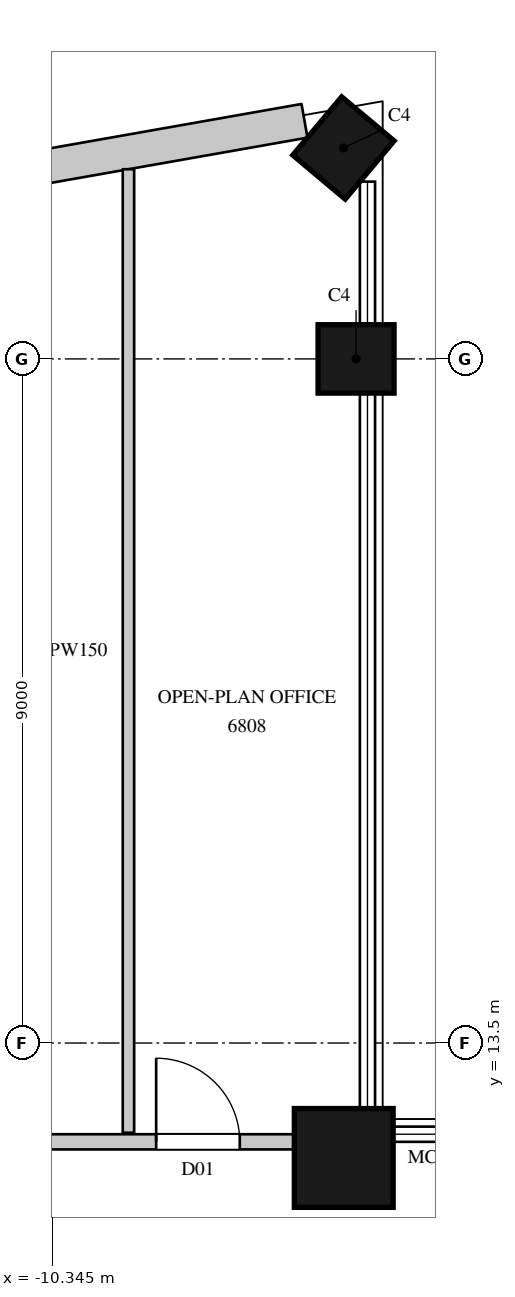
"""IFC4 building model, lengths in metres.
Left out: names, types, materials, properties, quantities, classifications, styles, units other than length and angle.
Written with IfcOpenShell. Run it as: python <this file> out.ifc"""

import sys

from ifc_helpers import new_model, si_unit, direction, frame, frame_2d, origin, origin_2d, place, context, subcontext, project, spatial, rectangle, circle, extrude, element, fill, save


model = new_model("IFC4")
c1 = context("Model", 3, precision=1e-05, world=origin(), true_north=direction((0.0, 1.0)))
c2 = subcontext(c1, "Body", "Model", "MODEL_VIEW")
j1 = project(units=[si_unit("LENGTHUNIT", "METRE"), si_unit("PLANEANGLEUNIT", "RADIAN")], contexts=[c1])
p1 = place(None, origin())
s1 = spatial("IfcSite", under=j1, at=p1, CompositionType="ELEMENT")
p2 = place(p1, origin())
s2 = spatial("IfcBuilding", under=s1, at=p2, CompositionType="ELEMENT")
p3 = place(p2, frame((0.0, 0.0, 300.8)))
s3 = spatial("IfcBuildingStorey", under=s2, at=p3, CompositionType="ELEMENT", Elevation=300.8)
p4 = place(p3, frame((-6.512, 11.988, 0.0), z_axis=(0.0, 0.0, 1.0), x_axis=(1.0, 0.0, 0.0)))
e1 = element("IfcColumn", 1, at=p4, inside=s3, PredefinedType="COLUMN", context=c2, shape_type="SweptSolid", body=[
    extrude(circle(Radius=0.65, at=origin_2d()), origin(), (0.0, 0.0, 1.0), 4.1),
])
for number, where, z_axis, x_axis in (
    (2, (-6.35, 22.5, 0.0), (0.0, 0.0, 1.0), (0.0, 1.0, 0.0)),
    (3, (-6.516, 25.275, 0.0), (0.0, 0.0, 1.0), (-0.766, 0.643, 0.0)),
):
    element("IfcColumn", number, at=place(p3, frame(where, z_axis=z_axis, x_axis=x_axis)), inside=s3, PredefinedType="COLUMN", context=c2, shape_type="SweptSolid", body=[
        extrude(rectangle(XDim=0.9, YDim=1.0, at=origin_2d()), origin(), (0.0, 0.0, 1.0), 4.1),
    ])
p5 = place(p3, frame((-7.029, 25.632, 0.0), z_axis=(0.0, 0.0, 1.0), x_axis=(-0.984797606634, -0.173705710808, 0.0)))
e4 = element("IfcWall", 4, at=p5, inside=s3, PredefinedType="SOLIDWALL", context=c2, shape_type="SweptSolid", body=[
    extrude(rectangle(XDim=5.772, YDim=0.45, at=frame_2d((2.886, 0.0))), origin(), (0.0, 0.0, 1.0), 3.8),
])
p6 = place(p5, frame((3.593, 0.0, 1.05)))
e5 = element("IfcOpeningElement", 5, at=p6, cuts=e4, PredefinedType="OPENING", context=c2, shape_type="SweptSolid", body=[
    extrude(rectangle(XDim=1.8, YDim=2.4, at=frame_2d((0.9, 1.2))), frame((0.0, 0.235, 0.0), z_axis=(0.0, -1.0, 0.0), x_axis=(1.0, 0.0, 0.0)), (0.0, 0.0, 1.0), 0.47),
])
p7 = place(p3, frame((-10.88, 12.2, 0.0), z_axis=(0.0, 0.0, 1.0), x_axis=(1.0, 0.0, 0.0)))
e6 = element("IfcWall", 6, at=p7, inside=s3, PredefinedType="PARTITIONING", context=c2, shape_type="SweptSolid", body=[
    extrude(rectangle(XDim=3.736, YDim=0.2, at=frame_2d((1.868, 0.0))), origin(), (0.0, 0.0, 1.0), 3.8),
])
p8 = place(p7, frame((1.9, 0.0, 0.0)))
e7 = element("IfcOpeningElement", 7, at=p8, cuts=e6, PredefinedType="OPENING", context=c2, shape_type="SweptSolid", body=[
    extrude(rectangle(XDim=1.1, YDim=2.4, at=frame_2d((0.55, 1.2))), frame((0.0, 0.11, 0.0), z_axis=(0.0, -1.0, 0.0), x_axis=(1.0, 0.0, 0.0)), (0.0, 0.0, 1.0), 0.22),
])
p9 = place(p3, frame((-9.344, 12.32, 0.0), z_axis=(0.0, 0.0, 1.0), x_axis=(0.0, 1.0, 0.0)))
e8 = element("IfcWall", 8, at=p9, inside=s3, PredefinedType="PARTITIONING", context=c2, shape_type="SweptSolid", body=[
    extrude(rectangle(XDim=12.675, YDim=0.15, at=frame_2d((6.338, 0.0))), origin(), (0.0, 0.0, 1.0), 3.8),
])
p10 = place(p8, origin())
e9 = element("IfcDoor", 9, at=p10, inside=s3, OperationType="SINGLE_SWING_LEFT", PredefinedType="DOOR", context=c2, shape_type="SweptSolid", body=[
    extrude(rectangle(XDim=1.1, YDim=2.4, at=frame_2d((0.55, 1.2))), frame((0.0, 0.025, 0.0), z_axis=(0.0, -1.0, 0.0), x_axis=(1.0, 0.0, 0.0)), (0.0, 0.0, 1.0), 0.05),
])
fill(e7, e9)
save(model, sys.argv[1])
